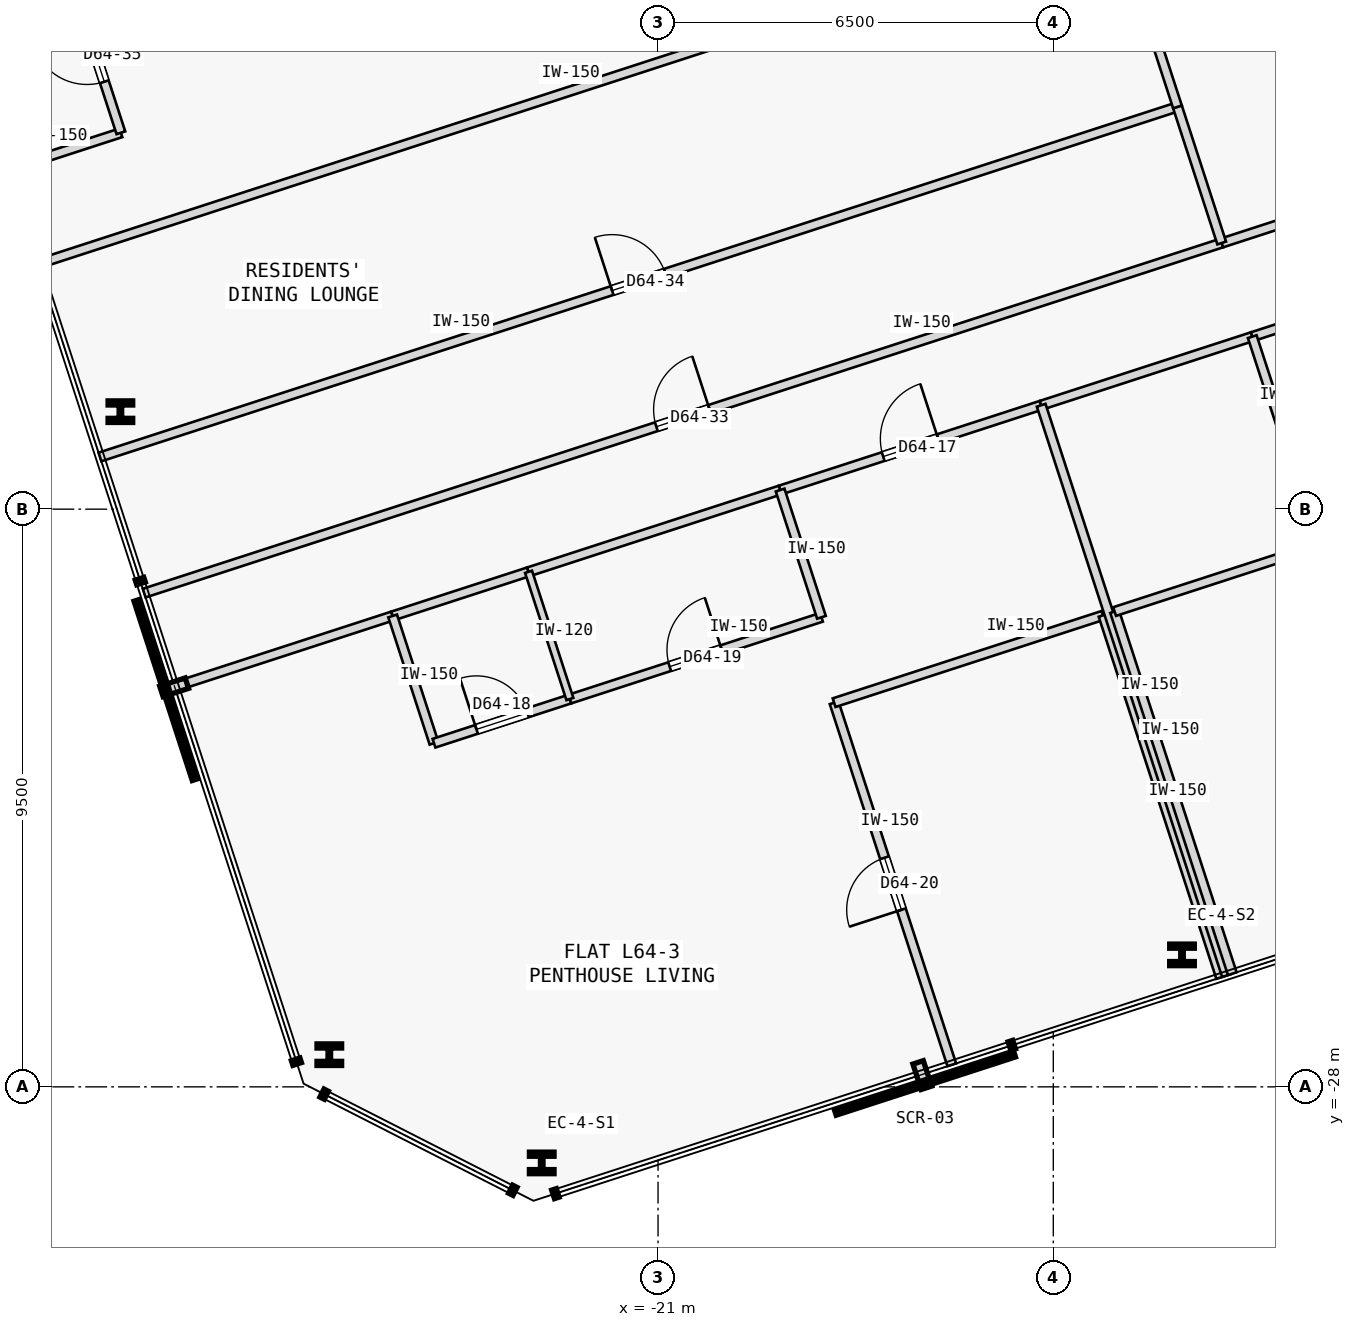
"""IFC4 building model, lengths in metres.
Left out: names, types, materials, properties, quantities, classifications, styles, units other than length and angle.
Written with IfcOpenShell. Run it as: python <this file> out.ifc"""

import sys

from ifc_helpers import new_model, si_unit, direction, frame, frame_2d, origin, origin_2d, place, context, subcontext, project, spatial, rectangle, i_section, extrude, element, fill, save


model = new_model("IFC4")
c1 = context("Model", 3, precision=1e-05, world=origin(), true_north=direction((0.0, 1.0)))
c2 = subcontext(c1, "Body", "Model", "MODEL_VIEW")
j1 = project(units=[si_unit("LENGTHUNIT", "METRE"), si_unit("PLANEANGLEUNIT", "RADIAN")], contexts=[c1])
p1 = place(None, origin())
s1 = spatial("IfcSite", under=j1, at=p1, CompositionType="ELEMENT")
p2 = place(p1, origin())
s2 = spatial("IfcBuilding", under=s1, at=p2, CompositionType="ELEMENT")
p3 = place(p2, frame((0.0, 0.0, 241.05)))
s3 = spatial("IfcBuildingStorey", under=s2, at=p3, CompositionType="ELEMENT", Elevation=241.05)
for number, where, z_axis, x_axis in (
    (1, (-22.913, -29.251, 0.0), (0.0, 0.0, 1.0), (1.0, 0.0, 0.0)),
    (2, (-12.384, -25.83, 0.0), (0.0, 0.0, 1.0), (1.0, 0.0, 0.0)),
    (3, (-29.842, -16.897, 0.0), (0.0, 0.0, 1.0), (1.0, 0.0, 0.0)),
    (4, (-26.406, -27.471, 0.0), (0.0, 0.0, 1.0), (1.0, 0.0, 0.0)),
):
    element("IfcColumn", number, at=place(p3, frame(where, z_axis=z_axis, x_axis=x_axis)), inside=s3, PredefinedType="COLUMN", context=c2, shape_type="SweptSolid", body=[
        extrude(i_section(OverallWidth=0.405, OverallDepth=0.355, WebThickness=0.042, FlangeThickness=0.068, FilletRadius=0.015, at=origin_2d()), origin(), (0.0, 0.0, 1.0), 3.35),
    ])
p4 = place(p3, frame((-28.95, -21.421, 0.0), z_axis=(0.0, 0.0, 1.0), x_axis=(0.951052151329, 0.309030428036, 0.0)))
e5 = element("IfcWall", 5, at=p4, inside=s3, PredefinedType="PARTITIONING", context=c2, shape_type="SweptSolid", body=[
    extrude(rectangle(XDim=3.77, YDim=0.15, at=frame_2d((1.885, 0.0))), origin(), (0.0, 0.0, 1.0), 3.125),
])
p5 = place(p3, frame((-18.992, -18.186, 0.0), z_axis=(0.0, 0.0, 1.0), x_axis=(0.951067846467, 0.308982121516, 0.0)))
e6 = element("IfcWall", 6, at=p5, inside=s3, PredefinedType="PARTITIONING", context=c2, shape_type="SweptSolid", body=[
    extrude(rectangle(XDim=4.514, YDim=0.15, at=frame_2d((2.257, 0.0))), origin(), (0.0, 0.0, 1.0), 3.125),
])
p6 = place(p5, frame((1.782, 0.0, 0.0)))
e7 = element("IfcOpeningElement", 7, at=p6, cuts=e6, PredefinedType="OPENING", context=c2, shape_type="SweptSolid", body=[
    extrude(rectangle(XDim=0.95, YDim=2.15, at=frame_2d((0.475, 1.075))), frame((0.0, 0.085, 0.0), z_axis=(0.0, -1.0, 0.0), x_axis=(1.0, 0.0, 0.0)), (0.0, 0.0, 1.0), 0.17),
])
p7 = place(p3, frame((-25.365, -20.256, 0.0), z_axis=(0.0, 0.0, 1.0), x_axis=(0.951076048914, 0.308956872689, 0.0)))
e8 = element("IfcWall", 8, at=p7, inside=s3, PredefinedType="PARTITIONING", context=c2, shape_type="SweptSolid", body=[
    extrude(rectangle(XDim=2.35, YDim=0.15, at=frame_2d((1.175, 0.0))), origin(), (0.0, 0.0, 1.0), 3.125),
])
p8 = place(p3, frame((-23.129, -19.53, 0.0), z_axis=(0.0, 0.0, 1.0), x_axis=(0.951036130958, 0.309079726951, 0.0)))
e9 = element("IfcWall", 9, at=p8, inside=s3, PredefinedType="PARTITIONING", context=c2, shape_type="SweptSolid", body=[
    extrude(rectangle(XDim=4.35, YDim=0.15, at=frame_2d((2.175, 0.0))), origin(), (0.0, 0.0, 1.0), 3.125),
])
p9 = place(p3, frame((-14.699, -16.791, 0.0), z_axis=(0.0, 0.0, 1.0), x_axis=(0.951050780541, 0.309034646652, 0.0)))
e10 = element("IfcWall", 10, at=p9, inside=s3, PredefinedType="PARTITIONING", context=c2, shape_type="SweptSolid", body=[
    extrude(rectangle(XDim=3.65, YDim=0.15, at=frame_2d((1.825, 0.0))), origin(), (0.0, 0.0, 1.0), 3.125),
])
p10 = place(p3, frame((-11.228, -15.663, 0.0), z_axis=(0.0, 0.0, 1.0), x_axis=(0.951076048914, 0.308956872689, 0.0)))
e11 = element("IfcWall", 11, at=p10, inside=s3, PredefinedType="PARTITIONING", context=c2, shape_type="SweptSolid", body=[
    extrude(rectangle(XDim=2.35, YDim=0.15, at=frame_2d((1.175, 0.0))), origin(), (0.0, 0.0, 1.0), 3.125),
])
p11 = place(p3, frame((-29.45, -19.881, 0.0), z_axis=(0.0, 0.0, 1.0), x_axis=(0.95105650271, 0.309017036186, 0.0)))
e12 = element("IfcWall", 12, at=p11, inside=s3, PredefinedType="PARTITIONING", context=c2, shape_type="SweptSolid", body=[
    extrude(rectangle(XDim=18.632, YDim=0.15, at=frame_2d((9.316, 0.0))), origin(), (0.0, 0.0, 1.0), 3.125),
])
p12 = place(p11, frame((8.856, 0.0, 0.0)))
e13 = element("IfcOpeningElement", 13, at=p12, cuts=e12, PredefinedType="OPENING", context=c2, shape_type="SweptSolid", body=[
    extrude(rectangle(XDim=0.92, YDim=2.15, at=frame_2d((0.46, 1.075))), frame((0.0, 0.085, 0.0), z_axis=(0.0, -1.0, 0.0), x_axis=(1.0, 0.0, 0.0)), (0.0, 0.0, 1.0), 0.17),
])
p13 = place(p3, frame((-31.712, -12.921, 0.0), z_axis=(0.0, 0.0, 1.0), x_axis=(0.951054051148, 0.309024581215, 0.0)))
e14 = element("IfcWall", 14, at=p13, inside=s3, PredefinedType="PARTITIONING", context=c2, shape_type="SweptSolid", body=[
    extrude(rectangle(XDim=1.975, YDim=0.15, at=frame_2d((0.988, 0.0))), origin(), (0.0, 0.0, 1.0), 3.125),
])
p14 = place(p3, frame((-29.833, -12.311, 0.0), z_axis=(0.0, 0.0, 1.0), x_axis=(-0.309044953986, 0.951047431213, 0.0)))
e15 = element("IfcWall", 15, at=p14, inside=s3, PredefinedType="PARTITIONING", context=c2, shape_type="SweptSolid", body=[
    extrude(rectangle(XDim=2.685, YDim=0.15, at=frame_2d((1.343, 0.0))), origin(), (0.0, 0.0, 1.0), 3.125),
])
p15 = place(p14, frame((0.883, 0.0, 0.0)))
e16 = element("IfcOpeningElement", 16, at=p15, cuts=e15, PredefinedType="OPENING", context=c2, shape_type="SweptSolid", body=[
    extrude(rectangle(XDim=0.92, YDim=2.15, at=frame_2d((0.46, 1.075))), frame((0.0, 0.085, 0.0), z_axis=(0.0, -1.0, 0.0), x_axis=(1.0, 0.0, 0.0)), (0.0, 0.0, 1.0), 0.17),
])
p16 = place(p3, frame((-11.73, -14.123, 0.0), z_axis=(0.0, 0.0, 1.0), x_axis=(0.951052502763, 0.309029346483, 0.0)))
e17 = element("IfcWall", 17, at=p16, inside=s3, PredefinedType="PARTITIONING", context=c2, shape_type="SweptSolid", body=[
    extrude(rectangle(XDim=3.698, YDim=0.15, at=frame_2d((1.849, 0.0))), origin(), (0.0, 0.0, 1.0), 3.125),
])
p17 = place(p16, frame((1.389, 0.0, 0.0)))
e18 = element("IfcOpeningElement", 18, at=p17, cuts=e17, PredefinedType="OPENING", context=c2, shape_type="SweptSolid", body=[
    extrude(rectangle(XDim=0.92, YDim=2.15, at=frame_2d((0.46, 1.075))), frame((0.0, 0.085, 0.0), z_axis=(0.0, -1.0, 0.0), x_axis=(1.0, 0.0, 0.0)), (0.0, 0.0, 1.0), 0.17),
])
p18 = place(p3, frame((-24.685, -22.349, 0.0), z_axis=(0.0, 0.0, 1.0), x_axis=(-0.309060979314, 0.951042223598, 0.0)))
e19 = element("IfcWall", 19, at=p18, inside=s3, PredefinedType="PARTITIONING", context=c2, shape_type="SweptSolid", body=[
    extrude(rectangle(XDim=2.2, YDim=0.15, at=frame_2d((1.1, 0.0))), origin(), (0.0, 0.0, 1.0), 3.125),
])
p19 = place(p3, frame((-24.685, -22.349, 0.0), z_axis=(0.0, 0.0, 1.0), x_axis=(0.951066131077, 0.308987401554, 0.0)))
e20 = element("IfcWall", 20, at=p19, inside=s3, PredefinedType="PARTITIONING", context=c2, shape_type="SweptSolid", body=[
    extrude(rectangle(XDim=2.35, YDim=0.15, at=frame_2d((1.175, 0.0))), origin(), (0.0, 0.0, 1.0), 3.125),
])
p20 = place(p19, frame((0.735, 0.0, 0.0)))
e21 = element("IfcOpeningElement", 21, at=p20, cuts=e20, PredefinedType="OPENING", context=c2, shape_type="SweptSolid", body=[
    extrude(rectangle(XDim=0.88, YDim=2.15, at=frame_2d((0.44, 1.075))), frame((0.0, 0.085, 0.0), z_axis=(0.0, -1.0, 0.0), x_axis=(1.0, 0.0, 0.0)), (0.0, 0.0, 1.0), 0.17),
])
p21 = place(p3, frame((-22.45, -21.623, 0.0), z_axis=(0.0, 0.0, 1.0), x_axis=(0.951057987102, 0.309012467661, 0.0)))
e22 = element("IfcWall", 22, at=p21, inside=s3, PredefinedType="PARTITIONING", context=c2, shape_type="SweptSolid", body=[
    extrude(rectangle(XDim=4.35, YDim=0.15, at=frame_2d((2.175, 0.0))), origin(), (0.0, 0.0, 1.0), 3.125),
])
p22 = place(p21, frame((1.725, 0.0, 0.0)))
e23 = element("IfcOpeningElement", 23, at=p22, cuts=e22, PredefinedType="OPENING", context=c2, shape_type="SweptSolid", body=[
    extrude(rectangle(XDim=0.9, YDim=2.15, at=frame_2d((0.45, 1.075))), frame((0.0, 0.085, 0.0), z_axis=(0.0, -1.0, 0.0), x_axis=(1.0, 0.0, 0.0)), (0.0, 0.0, 1.0), 0.17),
])
p23 = place(p3, frame((-18.312, -20.278, 0.0), z_axis=(0.0, 0.0, 1.0), x_axis=(-0.309028364152, 0.951052821956, 0.0)))
e24 = element("IfcWall", 24, at=p23, inside=s3, PredefinedType="PARTITIONING", context=c2, shape_type="SweptSolid", body=[
    extrude(rectangle(XDim=2.2, YDim=0.15, at=frame_2d((1.1, 0.0))), origin(), (0.0, 0.0, 1.0), 3.125),
])
p24 = place(p3, frame((-16.169, -27.638, 0.0), z_axis=(0.0, 0.0, 1.0), x_axis=(-0.309049046683, 0.951046101272, 0.0)))
e25 = element("IfcWall", 25, at=p24, inside=s3, PredefinedType="PARTITIONING", context=c2, shape_type="SweptSolid", body=[
    extrude(rectangle(XDim=6.262, YDim=0.15, at=frame_2d((3.131, 0.0))), origin(), (0.0, 0.0, 1.0), 3.125),
])
p25 = place(p24, frame((2.681, 0.0, 0.0)))
e26 = element("IfcOpeningElement", 26, at=p25, cuts=e25, PredefinedType="OPENING", context=c2, shape_type="SweptSolid", body=[
    extrude(rectangle(XDim=0.9, YDim=2.15, at=frame_2d((0.45, 1.075))), frame((0.0, 0.085, 0.0), z_axis=(0.0, -1.0, 0.0), x_axis=(1.0, 0.0, 0.0)), (0.0, 0.0, 1.0), 0.17),
])
p26 = place(p3, frame((-18.104, -21.683, 0.0), z_axis=(0.0, 0.0, 1.0), x_axis=(0.951055286502, 0.309020779263, 0.0)))
e27 = element("IfcWall", 27, at=p26, inside=s3, PredefinedType="PARTITIONING", context=c2, shape_type="SweptSolid", body=[
    extrude(rectangle(XDim=4.65, YDim=0.15, at=frame_2d((2.325, 0.0))), origin(), (0.0, 0.0, 1.0), 3.125),
])
p27 = place(p3, frame((-11.747, -26.201, 0.0), z_axis=(0.0, 0.0, 1.0), x_axis=(-0.309013782848, 0.951057559777, 0.0)))
e28 = element("IfcWall", 28, at=p27, inside=s3, PredefinedType="PARTITIONING", context=c2, shape_type="SweptSolid", body=[
    extrude(rectangle(XDim=6.262, YDim=0.15, at=frame_2d((3.131, 0.0))), origin(), (0.0, 0.0, 1.0), 3.125),
])
p28 = place(p3, frame((-11.652, -26.17, 0.0), z_axis=(0.0, 0.0, 1.0), x_axis=(-0.308999867152, 0.951062081097, 0.0)))
e29 = element("IfcWall", 29, at=p28, inside=s3, PredefinedType="PARTITIONING", context=c2, shape_type="SweptSolid", body=[
    extrude(rectangle(XDim=9.862, YDim=0.15, at=frame_2d((4.931, 0.0))), origin(), (0.0, 0.0, 1.0), 3.125),
])
p29 = place(p3, frame((-22.45, -21.623, 0.0), z_axis=(0.0, 0.0, 1.0), x_axis=(-0.308960600764, 0.951074837842, 0.0)))
e30 = element("IfcWall", 30, at=p29, inside=s3, PredefinedType="PARTITIONING", context=c2, shape_type="SweptSolid", body=[
    extrude(rectangle(XDim=2.2, YDim=0.12, at=frame_2d((1.1, 0.0))), origin(), (0.0, 0.0, 1.0), 3.125),
])
p30 = place(p3, frame((-10.548, -17.755, 0.0), z_axis=(0.0, 0.0, 1.0), x_axis=(-0.309060979314, 0.951042223598, 0.0)))
e31 = element("IfcWall", 31, at=p30, inside=s3, PredefinedType="PARTITIONING", context=c2, shape_type="SweptSolid", body=[
    extrude(rectangle(XDim=2.2, YDim=0.15, at=frame_2d((1.1, 0.0))), origin(), (0.0, 0.0, 1.0), 3.125),
])
p31 = place(p3, frame((-11.557, -26.139, 0.0), z_axis=(0.0, 0.0, 1.0), x_axis=(-0.309013782848, 0.951057559777, 0.0)))
e32 = element("IfcWall", 32, at=p31, inside=s3, PredefinedType="PARTITIONING", context=c2, shape_type="SweptSolid", body=[
    extrude(rectangle(XDim=6.262, YDim=0.15, at=frame_2d((3.131, 0.0))), origin(), (0.0, 0.0, 1.0), 3.125),
])
p32 = place(p3, frame((-13.492, -20.184, 0.0), z_axis=(0.0, 0.0, 1.0), x_axis=(0.951065702951, 0.308988719326, 0.0)))
e33 = element("IfcWall", 33, at=p32, inside=s3, PredefinedType="PARTITIONING", context=c2, shape_type="SweptSolid", body=[
    extrude(rectangle(XDim=4.65, YDim=0.15, at=frame_2d((2.325, 0.0))), origin(), (0.0, 0.0, 1.0), 3.125),
])
p33 = place(p3, frame((-30.178, -17.642, 0.0), z_axis=(0.0, 0.0, 1.0), x_axis=(0.95105650271, 0.309017036186, 0.0)))
e34 = element("IfcWall", 34, at=p33, inside=s3, PredefinedType="PARTITIONING", context=c2, shape_type="SweptSolid", body=[
    extrude(rectangle(XDim=18.632, YDim=0.15, at=frame_2d((9.316, 0.0))), origin(), (0.0, 0.0, 1.0), 3.125),
])
p34 = place(p33, frame((8.856, 0.0, 0.0)))
e35 = element("IfcOpeningElement", 35, at=p34, cuts=e34, PredefinedType="OPENING", context=c2, shape_type="SweptSolid", body=[
    extrude(rectangle(XDim=0.92, YDim=2.15, at=frame_2d((0.46, 1.075))), frame((0.0, 0.085, 0.0), z_axis=(0.0, -1.0, 0.0), x_axis=(1.0, 0.0, 0.0)), (0.0, 0.0, 1.0), 0.17),
])
p35 = place(p3, frame((-11.73, -14.123, 0.0), z_axis=(0.0, 0.0, 1.0), x_axis=(-0.309062621189, 0.951041690035, 0.0)))
e36 = element("IfcWall", 36, at=p35, inside=s3, PredefinedType="PARTITIONING", context=c2, shape_type="SweptSolid", body=[
    extrude(rectangle(XDim=2.354, YDim=0.15, at=frame_2d((1.177, 0.0))), origin(), (0.0, 0.0, 1.0), 3.125),
])
p36 = place(p3, frame((-31.208, -14.471, 0.0), z_axis=(0.0, 0.0, 1.0), x_axis=(0.951057753948, 0.309013185244, 0.0)))
e37 = element("IfcWall", 37, at=p36, inside=s3, PredefinedType="PARTITIONING", context=c2, shape_type="SweptSolid", body=[
    extrude(rectangle(XDim=18.632, YDim=0.15, at=frame_2d((9.316, 0.0))), origin(), (0.0, 0.0, 1.0), 3.125),
])
p37 = place(p3, frame((-12.458, -11.884, 0.0), z_axis=(0.0, 0.0, 1.0), x_axis=(-0.308946982245, 0.951079261766, 0.0)))
e38 = element("IfcWall", 38, at=p37, inside=s3, PredefinedType="PARTITIONING", context=c2, shape_type="SweptSolid", body=[
    extrude(rectangle(XDim=3.334, YDim=0.15, at=frame_2d((1.667, 0.0))), origin(), (0.0, 0.0, 1.0), 3.125),
])
p38 = place(p6, origin())
e39 = element("IfcDoor", 39, at=p38, inside=s3, OperationType="SINGLE_SWING_RIGHT", PredefinedType="DOOR", context=c2, shape_type="SweptSolid", body=[
    extrude(rectangle(XDim=0.95, YDim=2.15, at=frame_2d((0.475, 1.075))), frame((0.0, 0.025, 0.0), z_axis=(0.0, -1.0, 0.0), x_axis=(1.0, 0.0, 0.0)), (0.0, 0.0, 1.0), 0.05),
])
fill(e7, e39)
p39 = place(p20, origin())
e40 = element("IfcDoor", 40, at=p39, inside=s3, OperationType="SINGLE_SWING_LEFT", PredefinedType="DOOR", context=c2, shape_type="SweptSolid", body=[
    extrude(rectangle(XDim=0.88, YDim=2.15, at=frame_2d((0.44, 1.075))), frame((0.0, 0.025, 0.0), z_axis=(0.0, -1.0, 0.0), x_axis=(1.0, 0.0, 0.0)), (0.0, 0.0, 1.0), 0.05),
])
fill(e21, e40)
p40 = place(p22, origin())
e41 = element("IfcDoor", 41, at=p40, inside=s3, OperationType="SINGLE_SWING_RIGHT", PredefinedType="DOOR", context=c2, shape_type="SweptSolid", body=[
    extrude(rectangle(XDim=0.9, YDim=2.15, at=frame_2d((0.45, 1.075))), frame((0.0, 0.025, 0.0), z_axis=(0.0, -1.0, 0.0), x_axis=(1.0, 0.0, 0.0)), (0.0, 0.0, 1.0), 0.05),
])
fill(e23, e41)
p41 = place(p25, origin())
e42 = element("IfcDoor", 42, at=p41, inside=s3, OperationType="SINGLE_SWING_LEFT", PredefinedType="DOOR", context=c2, shape_type="SweptSolid", body=[
    extrude(rectangle(XDim=0.9, YDim=2.15, at=frame_2d((0.45, 1.075))), frame((0.0, 0.025, 0.0), z_axis=(0.0, -1.0, 0.0), x_axis=(1.0, 0.0, 0.0)), (0.0, 0.0, 1.0), 0.05),
])
fill(e26, e42)
p42 = place(p12, origin())
e43 = element("IfcDoor", 43, at=p42, inside=s3, OperationType="SINGLE_SWING_RIGHT", PredefinedType="DOOR", context=c2, shape_type="SweptSolid", body=[
    extrude(rectangle(XDim=0.92, YDim=2.15, at=frame_2d((0.46, 1.075))), frame((0.0, 0.025, 0.0), z_axis=(0.0, -1.0, 0.0), x_axis=(1.0, 0.0, 0.0)), (0.0, 0.0, 1.0), 0.05),
])
fill(e13, e43)
p43 = place(p34, origin())
e44 = element("IfcDoor", 44, at=p43, inside=s3, OperationType="SINGLE_SWING_LEFT", PredefinedType="DOOR", context=c2, shape_type="SweptSolid", body=[
    extrude(rectangle(XDim=0.92, YDim=2.15, at=frame_2d((0.46, 1.075))), frame((0.0, 0.025, 0.0), z_axis=(0.0, -1.0, 0.0), x_axis=(1.0, 0.0, 0.0)), (0.0, 0.0, 1.0), 0.05),
])
fill(e35, e44)
p44 = place(p15, origin())
e45 = element("IfcDoor", 45, at=p44, inside=s3, OperationType="SINGLE_SWING_RIGHT", PredefinedType="DOOR", context=c2, shape_type="SweptSolid", body=[
    extrude(rectangle(XDim=0.92, YDim=2.15, at=frame_2d((0.46, 1.075))), frame((0.0, 0.025, 0.0), z_axis=(0.0, -1.0, 0.0), x_axis=(1.0, 0.0, 0.0)), (0.0, 0.0, 1.0), 0.05),
])
fill(e16, e45)
save(model, sys.argv[1])
